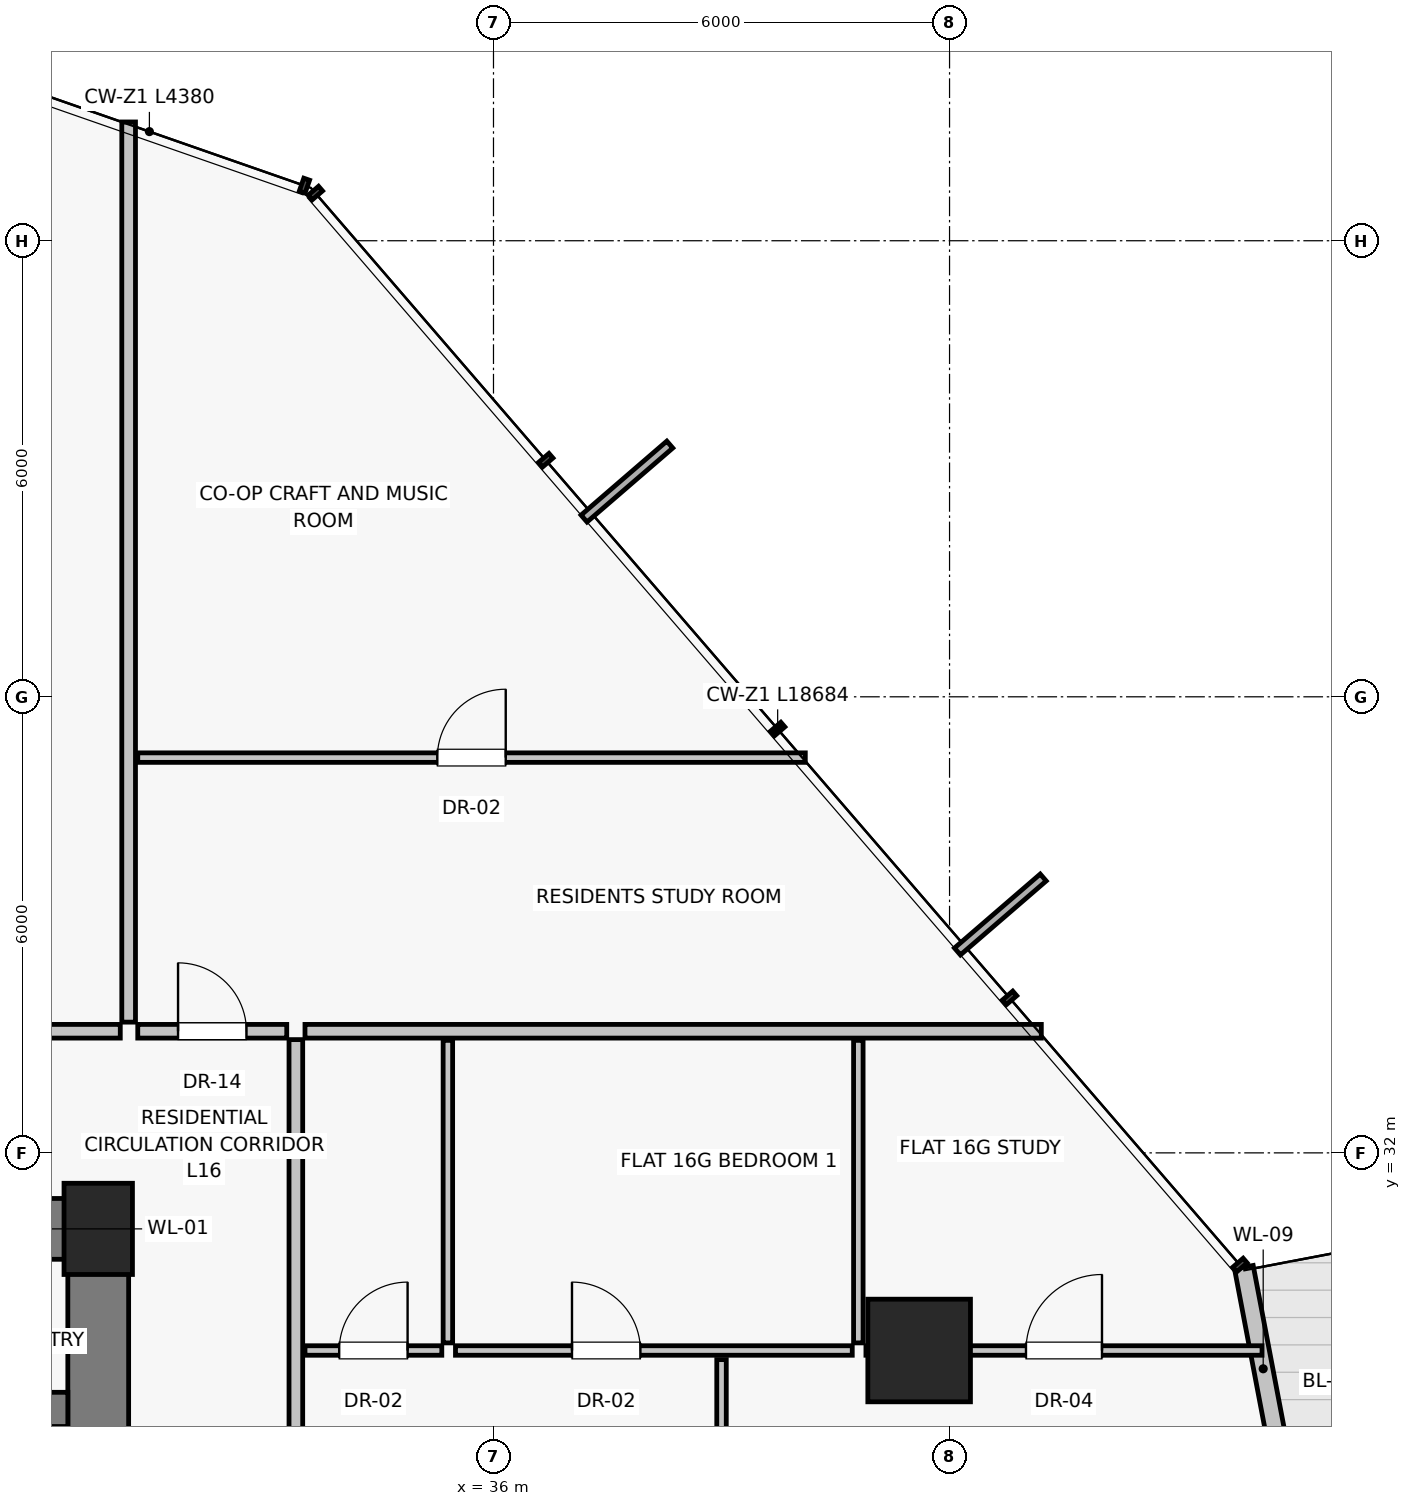
"""IFC4 building model, lengths in metres.
Left out: names, types, materials, properties, quantities, classifications, styles, units other than length and angle.
Written with IfcOpenShell. Run it as: python <this file> out.ifc"""

import sys

from ifc_helpers import new_model, si_unit, direction, frame, frame_2d, origin, origin_2d, place, context, subcontext, project, spatial, rectangle, extrude, source, transform, mapped, element, fill, save


model = new_model("IFC4")
c1 = context("Model", 3, precision=1e-05, world=origin(), true_north=direction((0.0, 1.0)))
c2 = subcontext(c1, "Body", "Model", "MODEL_VIEW")
j1 = project(units=[si_unit("LENGTHUNIT", "METRE"), si_unit("PLANEANGLEUNIT", "RADIAN")], contexts=[c1])
p1 = place(None, origin())
s1 = spatial("IfcSite", under=j1, at=p1, CompositionType="ELEMENT")
p2 = place(p1, origin())
s2 = spatial("IfcBuilding", under=s1, at=p2, CompositionType="ELEMENT")
p3 = place(p2, frame((0.0, 0.0, 60.85)))
s3 = spatial("IfcBuildingStorey", under=s2, at=p3, CompositionType="ELEMENT", Elevation=60.85)
p4 = place(p3, frame((30.8, 31.0, 0.0), z_axis=(0.0, 0.0, 1.0), x_axis=(1.0, 0.0, 0.0)))
e1 = element("IfcColumn", 1, at=p4, inside=s3, PredefinedType="PILASTER", context=c2, shape_type="SweptSolid", body=[
    extrude(rectangle(XDim=0.9, YDim=1.2, at=origin_2d()), origin(), (0.0, 0.0, 1.0), 3.25),
])
p5 = place(p3, frame((41.6, 29.4, 0.0), z_axis=(0.0, 0.0, 1.0), x_axis=(1.0, 0.0, 0.0)))
e2 = element("IfcColumn", 2, at=p5, inside=s3, PredefinedType="COLUMN", context=c2, shape_type="SweptSolid", body=[
    extrude(rectangle(XDim=1.35, YDim=1.35, at=origin_2d()), origin(), (0.0, 0.0, 1.0), 3.25),
])
p6 = place(p3, frame((46.729, 25.996, 0.0), z_axis=(0.0, 0.0, 1.0), x_axis=(-0.187045972391, 0.982351161353, 0.0)))
e3 = element("IfcWall", 3, at=p6, inside=s3, PredefinedType="SOLIDWALL", context=c2, shape_type="SweptSolid", body=[
    extrude(rectangle(XDim=4.58, YDim=0.25, at=frame_2d((2.29, 0.0))), origin(), (0.0, 0.0, 1.0), 3.0),
])
p7 = place(p6, frame((0.46, 0.0, 0.0)))
e4 = element("IfcOpeningElement", 4, at=p7, cuts=e3, PredefinedType="OPENING", context=c2, shape_type="SweptSolid", body=[
    extrude(rectangle(XDim=1.15, YDim=2.25, at=frame_2d((0.575, 1.125))), frame((0.0, 0.135, 0.0), z_axis=(0.0, -1.0, 0.0), x_axis=(1.0, 0.0, 0.0)), (0.0, 0.0, 1.0), 0.27),
])
p8 = place(p3, frame((30.8, 16.8, 0.0), z_axis=(0.0, 0.0, 1.0), x_axis=(0.0, 1.0, 0.0)))
e5 = element("IfcWall", 5, at=p8, inside=s3, PredefinedType="SHEAR", context=c2, shape_type="SweptSolid", body=[
    extrude(rectangle(XDim=14.2, YDim=0.8, at=frame_2d((7.1, 0.0))), origin(), (0.0, 0.0, 1.0), 3.0),
])
p9 = place(p3, frame((27.0, 31.0, 0.0), z_axis=(0.0, 0.0, 1.0), x_axis=(1.0, 0.0, 0.0)))
e6 = element("IfcWall", 6, at=p9, inside=s3, PredefinedType="SHEAR", context=c2, shape_type="SweptSolid", body=[
    extrude(rectangle(XDim=3.8, YDim=0.8, at=frame_2d((1.9, 0.0))), origin(), (0.0, 0.0, 1.0), 3.0),
])
p10 = place(p9, frame((1.15, 0.0, 0.0)))
e7 = element("IfcOpeningElement", 7, at=p10, cuts=e6, PredefinedType="OPENING", context=c2, shape_type="SweptSolid", body=[
    extrude(rectangle(XDim=1.0, YDim=2.01, at=frame_2d((0.5, 1.005))), frame((0.0, 0.41, 0.0), z_axis=(0.0, -1.0, 0.0), x_axis=(1.0, 0.0, 0.0)), (0.0, 0.0, 1.0), 0.82),
])
p11 = place(p3, frame((26.975, 28.625, 0.0), z_axis=(0.0, 0.0, 1.0), x_axis=(1.0, 0.0, 0.0)))
e8 = element("IfcWall", 8, at=p11, inside=s3, PredefinedType="SHEAR", context=c2, shape_type="SweptSolid", body=[
    extrude(rectangle(XDim=3.425, YDim=0.45, at=frame_2d((1.712, 0.0))), origin(), (0.0, 0.0, 1.0), 3.0),
])
p12 = place(p3, frame((31.2, 33.72, 0.0), z_axis=(0.0, 0.0, 1.0), x_axis=(0.0, 1.0, 0.0)))
e9 = element("IfcWall", 9, at=p12, inside=s3, PredefinedType="PARTITIONING", context=c2, shape_type="SweptSolid", body=[
    extrude(rectangle(XDim=11.843, YDim=0.18, at=frame_2d((5.921, 0.0))), origin(), (0.0, 0.0, 1.0), 3.0),
])
p13 = place(p3, frame((25.718, 33.6, 0.0), z_axis=(0.0, 0.0, 1.0), x_axis=(1.0, 0.0, 0.0)))
e10 = element("IfcWall", 10, at=p13, inside=s3, PredefinedType="PARTITIONING", context=c2, shape_type="SweptSolid", body=[
    extrude(rectangle(XDim=5.372, YDim=0.18, at=frame_2d((2.686, 0.0))), origin(), (0.0, 0.0, 1.0), 3.0),
])
p14 = place(p13, frame((3.176, 0.0, 0.0)))
e11 = element("IfcOpeningElement", 11, at=p14, cuts=e10, PredefinedType="OPENING", context=c2, shape_type="SweptSolid", body=[
    extrude(rectangle(XDim=0.95, YDim=2.02, at=frame_2d((0.475, 1.01))), frame((0.0, 0.1, 0.0), z_axis=(0.0, -1.0, 0.0), x_axis=(1.0, 0.0, 0.0)), (0.0, 0.0, 1.0), 0.2),
])
p15 = place(p3, frame((33.52, 33.6, 0.0), z_axis=(0.0, 0.0, 1.0), x_axis=(1.0, 0.0, 0.0)))
e12 = element("IfcWall", 12, at=p15, inside=s3, PredefinedType="PARTITIONING", context=c2, shape_type="SweptSolid", body=[
    extrude(rectangle(XDim=9.688, YDim=0.18, at=frame_2d((4.844, 0.0))), origin(), (0.0, 0.0, 1.0), 3.0),
])
p16 = place(p3, frame((33.4, 18.71, 0.0), z_axis=(0.0, 0.0, 1.0), x_axis=(0.0, 1.0, 0.0)))
e13 = element("IfcWall", 13, at=p16, inside=s3, PredefinedType="PARTITIONING", context=c2, shape_type="SweptSolid", body=[
    extrude(rectangle(XDim=14.78, YDim=0.18, at=frame_2d((7.39, 0.0))), origin(), (0.0, 0.0, 1.0), 3.0),
])
p17 = place(p16, frame((5.94, 0.0, 0.0)))
e14 = element("IfcOpeningElement", 14, at=p17, cuts=e13, PredefinedType="OPENING", context=c2, shape_type="SweptSolid", body=[
    extrude(rectangle(XDim=0.95, YDim=2.02, at=frame_2d((0.475, 1.01))), frame((0.0, 0.1, 0.0), z_axis=(0.0, -1.0, 0.0), x_axis=(1.0, 0.0, 0.0)), (0.0, 0.0, 1.0), 0.2),
])
p18 = place(p3, frame((40.8, 29.5, 0.0), z_axis=(0.0, 0.0, 1.0), x_axis=(0.0, 1.0, 0.0)))
e15 = element("IfcWall", 15, at=p18, inside=s3, PredefinedType="PARTITIONING", context=c2, shape_type="SweptSolid", body=[
    extrude(rectangle(XDim=3.98, YDim=0.125, at=frame_2d((1.99, 0.0))), origin(), (0.0, 0.0, 1.0), 3.0),
])
p19 = place(p3, frame((40.9, 29.4, 0.0), z_axis=(0.0, 0.0, 1.0), x_axis=(1.0, 0.0, 0.0)))
e16 = element("IfcWall", 16, at=p19, inside=s3, PredefinedType="PARTITIONING", context=c2, shape_type="SweptSolid", body=[
    extrude(rectangle(XDim=5.211, YDim=0.125, at=frame_2d((2.605, 0.0))), origin(), (0.0, 0.0, 1.0), 2.299),
])
p20 = place(p19, frame((2.106, 0.0, 0.0)))
e17 = element("IfcOpeningElement", 17, at=p20, cuts=e16, PredefinedType="OPENING", context=c2, shape_type="SweptSolid", body=[
    extrude(rectangle(XDim=1.0, YDim=2.01, at=frame_2d((0.5, 1.005))), frame((0.0, 0.073, 0.0), z_axis=(0.0, -1.0, 0.0), x_axis=(1.0, 0.0, 0.0)), (0.0, 0.0, 1.0), 0.145),
])
p21 = place(p3, frame((39.0, 18.72, 0.0), z_axis=(0.0, 0.0, 1.0), x_axis=(0.0, 1.0, 0.0)))
e18 = element("IfcWall", 18, at=p21, inside=s3, PredefinedType="PARTITIONING", context=c2, shape_type="SweptSolid", body=[
    extrude(rectangle(XDim=10.56, YDim=0.125, at=frame_2d((5.28, 0.0))), origin(), (0.0, 0.0, 1.0), 3.0),
])
p22 = place(p21, frame((4.78, 0.0, 0.0)))
e19 = element("IfcOpeningElement", 19, at=p22, cuts=e18, PredefinedType="OPENING", context=c2, shape_type="SweptSolid", body=[
    extrude(rectangle(XDim=1.0, YDim=2.01, at=frame_2d((0.5, 1.005))), frame((0.0, 0.073, 0.0), z_axis=(0.0, -1.0, 0.0), x_axis=(1.0, 0.0, 0.0)), (0.0, 0.0, 1.0), 0.145),
])
p23 = place(p3, frame((33.52, 29.4, 0.0), z_axis=(0.0, 0.0, 1.0), x_axis=(1.0, 0.0, 0.0)))
e20 = element("IfcWall", 20, at=p23, inside=s3, PredefinedType="PARTITIONING", context=c2, shape_type="SweptSolid", body=[
    extrude(rectangle(XDim=1.8, YDim=0.125, at=frame_2d((0.9, 0.0))), origin(), (0.0, 0.0, 1.0), 3.0),
])
p24 = place(p23, frame((0.45, 0.0, 0.0)))
e21 = element("IfcOpeningElement", 21, at=p24, cuts=e20, PredefinedType="OPENING", context=c2, shape_type="SweptSolid", body=[
    extrude(rectangle(XDim=0.9, YDim=2.01, at=frame_2d((0.45, 1.005))), frame((0.0, 0.073, 0.0), z_axis=(0.0, -1.0, 0.0), x_axis=(1.0, 0.0, 0.0)), (0.0, 0.0, 1.0), 0.145),
])
p25 = place(p3, frame((35.4, 29.5, 0.0), z_axis=(0.0, 0.0, 1.0), x_axis=(0.0, 1.0, 0.0)))
e22 = element("IfcWall", 22, at=p25, inside=s3, PredefinedType="PARTITIONING", context=c2, shape_type="SweptSolid", body=[
    extrude(rectangle(XDim=3.98, YDim=0.125, at=frame_2d((1.99, 0.0))), origin(), (0.0, 0.0, 1.0), 3.0),
])
p26 = place(p3, frame((35.5, 29.4, 0.0), z_axis=(0.0, 0.0, 1.0), x_axis=(1.0, 0.0, 0.0)))
e23 = element("IfcWall", 23, at=p26, inside=s3, PredefinedType="PARTITIONING", context=c2, shape_type="SweptSolid", body=[
    extrude(rectangle(XDim=5.22, YDim=0.125, at=frame_2d((2.61, 0.0))), origin(), (0.0, 0.0, 1.0), 2.299),
])
p27 = place(p26, frame((1.533, 0.0, 0.0)))
e24 = element("IfcOpeningElement", 24, at=p27, cuts=e23, PredefinedType="OPENING", context=c2, shape_type="SweptSolid", body=[
    extrude(rectangle(XDim=0.9, YDim=2.01, at=frame_2d((0.45, 1.005))), frame((0.0, 0.073, 0.0), z_axis=(0.0, -1.0, 0.0), x_axis=(1.0, 0.0, 0.0)), (0.0, 0.0, 1.0), 0.145),
])
p28 = place(p3, frame((31.32, 33.6, 0.0), z_axis=(0.0, 0.0, 1.0), x_axis=(1.0, 0.0, 0.0)))
e25 = element("IfcWall", 25, at=p28, inside=s3, PredefinedType="PARTITIONING", context=c2, shape_type="SweptSolid", body=[
    extrude(rectangle(XDim=1.96, YDim=0.18, at=frame_2d((0.98, 0.0))), origin(), (0.0, 0.0, 1.0), 3.0),
])
p29 = place(p28, frame((0.53, 0.0, 0.0)))
e26 = element("IfcOpeningElement", 26, at=p29, cuts=e25, PredefinedType="OPENING", context=c2, shape_type="SweptSolid", body=[
    extrude(rectangle(XDim=0.9, YDim=2.01, at=frame_2d((0.45, 1.005))), frame((0.0, 0.1, 0.0), z_axis=(0.0, -1.0, 0.0), x_axis=(1.0, 0.0, 0.0)), (0.0, 0.0, 1.0), 0.2),
])
p30 = place(p3, frame((31.32, 37.2, 0.0), z_axis=(0.0, 0.0, 1.0), x_axis=(1.0, 0.0, 0.0)))
e27 = element("IfcWall", 27, at=p30, inside=s3, PredefinedType="PARTITIONING", context=c2, shape_type="SweptSolid", body=[
    extrude(rectangle(XDim=8.782, YDim=0.125, at=frame_2d((4.391, 0.0))), origin(), (0.0, 0.0, 1.0), 3.0),
])
p31 = place(p30, frame((3.941, 0.0, 0.0)))
e28 = element("IfcOpeningElement", 28, at=p31, cuts=e27, PredefinedType="OPENING", context=c2, shape_type="SweptSolid", body=[
    extrude(rectangle(XDim=0.9, YDim=2.01, at=frame_2d((0.45, 1.005))), frame((0.0, 0.073, 0.0), z_axis=(0.0, -1.0, 0.0), x_axis=(1.0, 0.0, 0.0)), (0.0, 0.0, 1.0), 0.145),
])
m1 = source(origin(), c2, "Body", "SweptSolid", [
    extrude(rectangle(XDim=1.0, YDim=2.01, at=frame_2d((0.5, 1.005))), frame((0.0, 0.025, 0.0), z_axis=(0.0, -1.0, 0.0), x_axis=(1.0, 0.0, 0.0)), (0.0, 0.0, 1.0), 0.05),
])
p32 = place(p20, origin())
e29 = element("IfcDoor", 29, at=p32, inside=s3, OperationType="SINGLE_SWING_RIGHT", PredefinedType="DOOR", context=c2, shape_type="MappedRepresentation", body=[
    mapped(m1, transform((0.0, 0.0, 0.0), scale=1.0)),
])
fill(e17, e29)
m2 = source(origin(), c2, "Body", "SweptSolid", [
    extrude(rectangle(XDim=0.9, YDim=2.01, at=frame_2d((0.45, 1.005))), frame((0.0, 0.025, 0.0), z_axis=(0.0, -1.0, 0.0), x_axis=(1.0, 0.0, 0.0)), (0.0, 0.0, 1.0), 0.05),
])
p33 = place(p24, origin())
e30 = element("IfcDoor", 30, at=p33, inside=s3, OperationType="SINGLE_SWING_RIGHT", PredefinedType="DOOR", context=c2, shape_type="MappedRepresentation", body=[
    mapped(m2, transform((0.0, 0.0, 0.0), scale=1.0)),
])
fill(e21, e30)
p34 = place(p27, origin())
e31 = element("IfcDoor", 31, at=p34, inside=s3, OperationType="SINGLE_SWING_LEFT", PredefinedType="DOOR", context=c2, shape_type="MappedRepresentation", body=[
    mapped(m2, transform((0.0, 0.0, 0.0), scale=1.0)),
])
fill(e24, e31)
p35 = place(p29, origin())
e32 = element("IfcDoor", 32, at=p35, inside=s3, OperationType="SINGLE_SWING_LEFT", PredefinedType="DOOR", context=c2, shape_type="MappedRepresentation", body=[
    mapped(m2, transform((0.0, 0.0, 0.0), scale=1.0)),
])
fill(e26, e32)
p36 = place(p31, origin())
e33 = element("IfcDoor", 33, at=p36, inside=s3, OperationType="SINGLE_SWING_RIGHT", PredefinedType="DOOR", context=c2, shape_type="MappedRepresentation", body=[
    mapped(m2, transform((0.0, 0.0, 0.0), scale=1.0)),
])
fill(e28, e33)
save(model, sys.argv[1])
